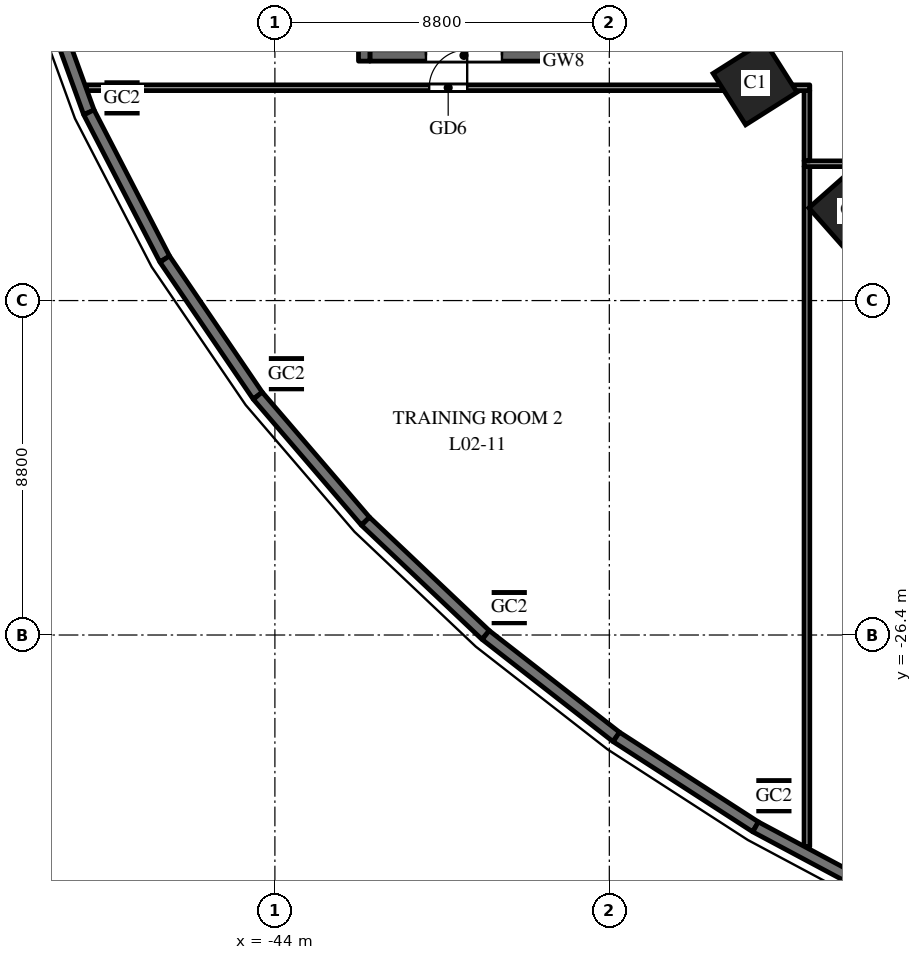
"""IFC4 building model, lengths in metres.
Left out: names, types, materials, properties, quantities, classifications, styles, units other than length and angle.
Written with IfcOpenShell. Run it as: python <this file> out.ifc"""

import sys

from ifc_helpers import new_model, si_unit, direction, frame, frame_2d, origin, origin_2d, place, context, subcontext, project, spatial, rectangle, hollow_rectangle, extrude, element, fill, save


model = new_model("IFC4")
c1 = context("Model", 3, precision=1e-05, world=origin(), true_north=direction((0.0, 1.0)))
c2 = subcontext(c1, "Body", "Model", "MODEL_VIEW")
j1 = project(units=[si_unit("LENGTHUNIT", "METRE"), si_unit("PLANEANGLEUNIT", "RADIAN")], contexts=[c1])
p1 = place(None, origin())
s1 = spatial("IfcSite", under=j1, at=p1, CompositionType="ELEMENT")
p2 = place(p1, origin())
s2 = spatial("IfcBuilding", under=s1, at=p2, CompositionType="ELEMENT")
p3 = place(p2, frame((0.0, 0.0, 13.5)))
s3 = spatial("IfcBuildingStorey", under=s2, at=p3, CompositionType="ELEMENT", Elevation=13.5)
for number, where, z_axis, x_axis in (
    (1, (-31.365, -11.871, 0.0), (0.0, 0.0, 1.0), (0.535, -0.845, 0.0)),
    (2, (-28.819, -15.23, 0.0), (0.0, 0.0, 1.0), (0.663, -0.749, 0.0)),
):
    element("IfcColumn", number, at=place(p3, frame(where, z_axis=z_axis, x_axis=x_axis)), inside=s3, PredefinedType="COLUMN", context=c2, shape_type="SweptSolid", body=[
        extrude(rectangle(XDim=1.6, YDim=1.6, at=origin_2d()), origin(), (0.0, 0.0, 1.0), 6.0),
    ])
for number, where, z_axis, x_axis in (
    (3, (-48.022, -12.267, 0.0), (0.0, 0.0, 1.0), (1.0, 0.0, 0.0)),
    (4, (-43.696, -19.525, 0.0), (0.0, 0.0, 1.0), (1.0, 0.0, 0.0)),
    (5, (-37.833, -25.68, 0.0), (0.0, 0.0, 1.0), (1.0, 0.0, 0.0)),
    (6, (-30.869, -30.629, 0.0), (0.0, 0.0, 1.0), (1.0, 0.0, 0.0)),
):
    element("IfcColumn", number, at=place(p3, frame(where, z_axis=z_axis, x_axis=x_axis)), inside=s3, PredefinedType="COLUMN", context=c2, shape_type="SweptSolid", body=[
        extrude(hollow_rectangle(XDim=0.8, YDim=0.8, WallThickness=0.04, at=origin_2d()), origin(), (0.0, 0.0, 1.0), 6.0),
    ])
p4 = place(p3, frame((-30.0, -31.97, 0.0), z_axis=(0.0, 0.0, 1.0), x_axis=(0.0, 1.0, 0.0)))
e7 = element("IfcWall", 7, at=p4, inside=s3, PredefinedType="PARTITIONING", context=c2, shape_type="SweptSolid", body=[
    extrude(rectangle(XDim=17.895, YDim=0.15, at=frame_2d((8.948, 0.0))), origin(), (0.0, 0.0, 1.0), 4.75),
])
p5 = place(p3, frame((-30.075, -14.0, 0.0), z_axis=(0.0, 0.0, 1.0), x_axis=(1.0, 0.0, 0.0)))
e8 = element("IfcWall", 8, at=p5, inside=s3, PredefinedType="PARTITIONING", context=c2, shape_type="SweptSolid", body=[
    extrude(rectangle(XDim=20.0, YDim=0.15, at=frame_2d((10.0, 0.0))), origin(), (0.0, 0.0, 1.0), 4.7),
])
p6 = place(p5, frame((9.5, 0.0, 0.0)))
e9 = element("IfcOpeningElement", 9, at=p6, cuts=e8, PredefinedType="OPENING", context=c2, shape_type="SweptSolid", body=[
    extrude(rectangle(XDim=1.0, YDim=2.1, at=frame_2d((0.5, 1.05))), frame((0.0, 0.085, 0.0), z_axis=(0.0, -1.0, 0.0), x_axis=(1.0, 0.0, 0.0)), (0.0, 0.0, 1.0), 0.17),
])
p7 = place(p3, frame((-30.0, -12.075, 0.0), z_axis=(0.0, 0.0, 1.0), x_axis=(0.0, -1.0, 0.0)))
e10 = element("IfcWall", 10, at=p7, inside=s3, PredefinedType="PARTITIONING", context=c2, shape_type="SweptSolid", body=[
    extrude(rectangle(XDim=1.851, YDim=0.15, at=frame_2d((0.926, 0.0))), origin(), (0.0, 0.0, 1.0), 4.85),
])
p8 = place(p3, frame((-48.955, -12.0, 0.0), z_axis=(0.0, 0.0, 1.0), x_axis=(1.0, 0.0, 0.0)))
e11 = element("IfcWall", 11, at=p8, inside=s3, PredefinedType="PARTITIONING", context=c2, shape_type="SweptSolid", body=[
    extrude(rectangle(XDim=19.03, YDim=0.15, at=frame_2d((9.515, 0.0))), origin(), (0.0, 0.0, 1.0), 4.75),
])
p9 = place(p8, frame((9.015, 0.0, 0.0)))
e12 = element("IfcOpeningElement", 12, at=p9, cuts=e11, PredefinedType="OPENING", context=c2, shape_type="SweptSolid", body=[
    extrude(rectangle(XDim=1.0, YDim=2.1, at=frame_2d((0.5, 1.05))), frame((0.0, 0.085, 0.0), z_axis=(0.0, -1.0, 0.0), x_axis=(1.0, 0.0, 0.0)), (0.0, 0.0, 1.0), 0.17),
])
p10 = place(p3, frame((-50.376, -8.568, 0.0), z_axis=(0.0, 0.0, 1.0), x_axis=(0.341286990045, -0.939959142956, 0.0)))
e13 = element("IfcWall", 13, at=p10, inside=s3, PredefinedType="SOLIDWALL", context=c2, shape_type="SweptSolid", body=[
    extrude(rectangle(XDim=4.342, YDim=0.3, at=frame_2d((2.171, 0.0))), origin(), (0.0, 0.0, 1.0), 5.75),
])
p11 = place(p10, frame((0.971, 0.0, 1.0)))
e14 = element("IfcOpeningElement", 14, at=p11, cuts=e13, PredefinedType="OPENING", context=c2, shape_type="SweptSolid", body=[
    extrude(rectangle(XDim=2.4, YDim=3.0, at=frame_2d((1.2, 1.5))), frame((0.0, 0.16, 0.0), z_axis=(0.0, -1.0, 0.0), x_axis=(1.0, 0.0, 0.0)), (0.0, 0.0, 1.0), 0.32),
])
p12 = place(p3, frame((-48.894, -12.649, 0.0), z_axis=(0.0, 0.0, 1.0), x_axis=(0.459242531468, -0.888310923771, 0.0)))
e15 = element("IfcWall", 15, at=p12, inside=s3, PredefinedType="SOLIDWALL", context=c2, shape_type="SweptSolid", body=[
    extrude(rectangle(XDim=4.345, YDim=0.3, at=frame_2d((2.172, 0.0))), origin(), (0.0, 0.0, 1.0), 5.75),
])
p13 = place(p12, frame((0.972, 0.0, 1.0)))
e16 = element("IfcOpeningElement", 16, at=p13, cuts=e15, PredefinedType="OPENING", context=c2, shape_type="SweptSolid", body=[
    extrude(rectangle(XDim=2.4, YDim=3.0, at=frame_2d((1.2, 1.5))), frame((0.0, 0.16, 0.0), z_axis=(0.0, -1.0, 0.0), x_axis=(1.0, 0.0, 0.0)), (0.0, 0.0, 1.0), 0.32),
])
p14 = place(p3, frame((-46.899, -16.508, 0.0), z_axis=(0.0, 0.0, 1.0), x_axis=(0.562667738859, -0.82668314102, 0.0)))
e17 = element("IfcWall", 17, at=p14, inside=s3, PredefinedType="SOLIDWALL", context=c2, shape_type="SweptSolid", body=[
    extrude(rectangle(XDim=4.349, YDim=0.3, at=frame_2d((2.174, 0.0))), origin(), (0.0, 0.0, 1.0), 5.75),
])
p15 = place(p14, frame((0.974, 0.0, 1.0)))
e18 = element("IfcOpeningElement", 18, at=p15, cuts=e17, PredefinedType="OPENING", context=c2, shape_type="SweptSolid", body=[
    extrude(rectangle(XDim=2.4, YDim=3.0, at=frame_2d((1.2, 1.5))), frame((0.0, 0.16, 0.0), z_axis=(0.0, -1.0, 0.0), x_axis=(1.0, 0.0, 0.0)), (0.0, 0.0, 1.0), 0.32),
])
p16 = place(p3, frame((-44.452, -20.104, 0.0), z_axis=(0.0, 0.0, 1.0), x_axis=(0.651387059497, -0.758745608699, 0.0)))
e19 = element("IfcWall", 19, at=p16, inside=s3, PredefinedType="SOLIDWALL", context=c2, shape_type="SweptSolid", body=[
    extrude(rectangle(XDim=4.353, YDim=0.3, at=frame_2d((2.176, 0.0))), origin(), (0.0, 0.0, 1.0), 5.75),
])
p17 = place(p16, frame((0.976, 0.0, 1.0)))
e20 = element("IfcOpeningElement", 20, at=p17, cuts=e19, PredefinedType="OPENING", context=c2, shape_type="SweptSolid", body=[
    extrude(rectangle(XDim=2.4, YDim=3.0, at=frame_2d((1.2, 1.5))), frame((0.0, 0.16, 0.0), z_axis=(0.0, -1.0, 0.0), x_axis=(1.0, 0.0, 0.0)), (0.0, 0.0, 1.0), 0.32),
])
p18 = place(p3, frame((-41.617, -23.406, 0.0), z_axis=(0.0, 0.0, 1.0), x_axis=(0.72620446032, -0.687478786444, 0.0)))
e21 = element("IfcWall", 21, at=p18, inside=s3, PredefinedType="SOLIDWALL", context=c2, shape_type="SweptSolid", body=[
    extrude(rectangle(XDim=4.356, YDim=0.3, at=frame_2d((2.178, 0.0))), origin(), (0.0, 0.0, 1.0), 5.75),
])
p19 = place(p18, frame((0.978, 0.0, 1.0)))
e22 = element("IfcOpeningElement", 22, at=p19, cuts=e21, PredefinedType="OPENING", context=c2, shape_type="SweptSolid", body=[
    extrude(rectangle(XDim=2.4, YDim=3.0, at=frame_2d((1.2, 1.5))), frame((0.0, 0.16, 0.0), z_axis=(0.0, -1.0, 0.0), x_axis=(1.0, 0.0, 0.0)), (0.0, 0.0, 1.0), 0.32),
])
p20 = place(p3, frame((-38.453, -26.401, 0.0), z_axis=(0.0, 0.0, 1.0), x_axis=(0.788491985196, -0.615045030288, 0.0)))
e23 = element("IfcWall", 23, at=p20, inside=s3, PredefinedType="SOLIDWALL", context=c2, shape_type="SweptSolid", body=[
    extrude(rectangle(XDim=4.359, YDim=0.3, at=frame_2d((2.18, 0.0))), origin(), (0.0, 0.0, 1.0), 5.75),
])
p21 = place(p20, frame((0.98, 0.0, 1.0)))
e24 = element("IfcOpeningElement", 24, at=p21, cuts=e23, PredefinedType="OPENING", context=c2, shape_type="SweptSolid", body=[
    extrude(rectangle(XDim=2.4, YDim=3.0, at=frame_2d((1.2, 1.5))), frame((0.0, 0.16, 0.0), z_axis=(0.0, -1.0, 0.0), x_axis=(1.0, 0.0, 0.0)), (0.0, 0.0, 1.0), 0.32),
])
p22 = place(p3, frame((-35.016, -29.082, 0.0), z_axis=(0.0, 0.0, 1.0), x_axis=(0.840047348843, -0.542513088969, 0.0)))
e25 = element("IfcWall", 25, at=p22, inside=s3, PredefinedType="SOLIDWALL", context=c2, shape_type="SweptSolid", body=[
    extrude(rectangle(XDim=4.362, YDim=0.3, at=frame_2d((2.181, 0.0))), origin(), (0.0, 0.0, 1.0), 5.75),
])
p23 = place(p22, frame((0.981, 0.0, 1.0)))
e26 = element("IfcOpeningElement", 26, at=p23, cuts=e25, PredefinedType="OPENING", context=c2, shape_type="SweptSolid", body=[
    extrude(rectangle(XDim=2.4, YDim=3.0, at=frame_2d((1.2, 1.5))), frame((0.0, 0.16, 0.0), z_axis=(0.0, -1.0, 0.0), x_axis=(1.0, 0.0, 0.0)), (0.0, 0.0, 1.0), 0.32),
])
p24 = place(p3, frame((-31.352, -31.448, 0.0), z_axis=(0.0, 0.0, 1.0), x_axis=(0.882159305704, -0.47095112205, 0.0)))
e27 = element("IfcWall", 27, at=p24, inside=s3, PredefinedType="SOLIDWALL", context=c2, shape_type="SweptSolid", body=[
    extrude(rectangle(XDim=4.365, YDim=0.3, at=frame_2d((2.182, 0.0))), origin(), (0.0, 0.0, 1.0), 5.75),
])
p25 = place(p24, frame((1.622, 0.0, 1.0)))
e28 = element("IfcOpeningElement", 28, at=p25, cuts=e27, PredefinedType="OPENING", context=c2, shape_type="SweptSolid", body=[
    extrude(rectangle(XDim=2.4, YDim=3.0, at=frame_2d((1.2, 1.5))), frame((0.0, 0.16, 0.0), z_axis=(0.0, -1.0, 0.0), x_axis=(1.0, 0.0, 0.0)), (0.0, 0.0, 1.0), 0.32),
])
for number, where, z_axis, x_axis in (
    (29, (-41.65, -11.3, 0.0), (0.0, 0.0, 1.0), (0.0, 1.0, 0.0)),
    (30, (-36.4, -11.3, 0.0), (0.0, 0.0, 1.0), (0.0, 1.0, 0.0)),
):
    element("IfcWall", number, at=place(p3, frame(where, z_axis=z_axis, x_axis=x_axis)), inside=s3, PredefinedType="SHEAR", context=c2, shape_type="SweptSolid", body=[
        extrude(rectangle(XDim=11.0, YDim=0.3, at=frame_2d((5.5, 0.0))), origin(), (0.0, 0.0, 1.0), 5.75),
    ])
p26 = place(p3, frame((-41.5, -11.15, 0.0), z_axis=(0.0, 0.0, 1.0), x_axis=(1.0, 0.0, 0.0)))
e31 = element("IfcWall", 31, at=p26, inside=s3, PredefinedType="SHEAR", context=c2, shape_type="SweptSolid", body=[
    extrude(rectangle(XDim=4.95, YDim=0.3, at=frame_2d((2.475, 0.0))), origin(), (0.0, 0.0, 1.0), 5.75),
])
p27 = place(p26, frame((1.475, 0.0, 0.0)))
e32 = element("IfcOpeningElement", 32, at=p27, cuts=e31, PredefinedType="OPENING", context=c2, shape_type="SweptSolid", body=[
    extrude(rectangle(XDim=2.0, YDim=2.1, at=frame_2d((1.0, 1.05))), frame((0.0, 0.16, 0.0), z_axis=(0.0, -1.0, 0.0), x_axis=(1.0, 0.0, 0.0)), (0.0, 0.0, 1.0), 0.32),
])
p28 = place(p9, origin())
e33 = element("IfcDoor", 33, at=p28, inside=s3, OperationType="SINGLE_SWING_RIGHT", PredefinedType="DOOR", context=c2, shape_type="SweptSolid", body=[
    extrude(rectangle(XDim=1.0, YDim=2.1, at=frame_2d((0.5, 1.05))), frame((0.0, 0.025, 0.0), z_axis=(0.0, -1.0, 0.0), x_axis=(1.0, 0.0, 0.0)), (0.0, 0.0, 1.0), 0.05),
])
fill(e12, e33)
p29 = place(p11, origin())
e34 = element("IfcWindow", 34, at=p29, inside=s3, PartitioningType="SINGLE_PANEL", PredefinedType="WINDOW", context=c2, shape_type="SweptSolid", body=[
    extrude(rectangle(XDim=2.4, YDim=3.0, at=frame_2d((1.2, 1.5))), frame((0.0, 0.03, 0.0), z_axis=(0.0, -1.0, 0.0), x_axis=(1.0, 0.0, 0.0)), (0.0, 0.0, 1.0), 0.06),
])
fill(e14, e34)
p30 = place(p13, origin())
e35 = element("IfcWindow", 35, at=p30, inside=s3, PartitioningType="SINGLE_PANEL", PredefinedType="WINDOW", context=c2, shape_type="SweptSolid", body=[
    extrude(rectangle(XDim=2.4, YDim=3.0, at=frame_2d((1.2, 1.5))), frame((0.0, 0.03, 0.0), z_axis=(0.0, -1.0, 0.0), x_axis=(1.0, 0.0, 0.0)), (0.0, 0.0, 1.0), 0.06),
])
fill(e16, e35)
p31 = place(p15, origin())
e36 = element("IfcWindow", 36, at=p31, inside=s3, PartitioningType="SINGLE_PANEL", PredefinedType="WINDOW", context=c2, shape_type="SweptSolid", body=[
    extrude(rectangle(XDim=2.4, YDim=3.0, at=frame_2d((1.2, 1.5))), frame((0.0, 0.03, 0.0), z_axis=(0.0, -1.0, 0.0), x_axis=(1.0, 0.0, 0.0)), (0.0, 0.0, 1.0), 0.06),
])
fill(e18, e36)
p32 = place(p17, origin())
e37 = element("IfcWindow", 37, at=p32, inside=s3, PartitioningType="SINGLE_PANEL", PredefinedType="WINDOW", context=c2, shape_type="SweptSolid", body=[
    extrude(rectangle(XDim=2.4, YDim=3.0, at=frame_2d((1.2, 1.5))), frame((0.0, 0.03, 0.0), z_axis=(0.0, -1.0, 0.0), x_axis=(1.0, 0.0, 0.0)), (0.0, 0.0, 1.0), 0.06),
])
fill(e20, e37)
p33 = place(p19, origin())
e38 = element("IfcWindow", 38, at=p33, inside=s3, PartitioningType="SINGLE_PANEL", PredefinedType="WINDOW", context=c2, shape_type="SweptSolid", body=[
    extrude(rectangle(XDim=2.4, YDim=3.0, at=frame_2d((1.2, 1.5))), frame((0.0, 0.03, 0.0), z_axis=(0.0, -1.0, 0.0), x_axis=(1.0, 0.0, 0.0)), (0.0, 0.0, 1.0), 0.06),
])
fill(e22, e38)
p34 = place(p21, origin())
e39 = element("IfcWindow", 39, at=p34, inside=s3, PartitioningType="SINGLE_PANEL", PredefinedType="WINDOW", context=c2, shape_type="SweptSolid", body=[
    extrude(rectangle(XDim=2.4, YDim=3.0, at=frame_2d((1.2, 1.5))), frame((0.0, 0.03, 0.0), z_axis=(0.0, -1.0, 0.0), x_axis=(1.0, 0.0, 0.0)), (0.0, 0.0, 1.0), 0.06),
])
fill(e24, e39)
p35 = place(p23, origin())
e40 = element("IfcWindow", 40, at=p35, inside=s3, PartitioningType="SINGLE_PANEL", PredefinedType="WINDOW", context=c2, shape_type="SweptSolid", body=[
    extrude(rectangle(XDim=2.4, YDim=3.0, at=frame_2d((1.2, 1.5))), frame((0.0, 0.03, 0.0), z_axis=(0.0, -1.0, 0.0), x_axis=(1.0, 0.0, 0.0)), (0.0, 0.0, 1.0), 0.06),
])
fill(e26, e40)
p36 = place(p25, origin())
e41 = element("IfcWindow", 41, at=p36, inside=s3, PartitioningType="SINGLE_PANEL", PredefinedType="WINDOW", context=c2, shape_type="SweptSolid", body=[
    extrude(rectangle(XDim=2.4, YDim=3.0, at=frame_2d((1.2, 1.5))), frame((0.0, 0.03, 0.0), z_axis=(0.0, -1.0, 0.0), x_axis=(1.0, 0.0, 0.0)), (0.0, 0.0, 1.0), 0.06),
])
fill(e28, e41)
p37 = place(p27, origin())
e42 = element("IfcDoor", 42, at=p37, inside=s3, OperationType="DOUBLE_DOOR_SINGLE_SWING", PredefinedType="DOOR", context=c2, shape_type="SweptSolid", body=[
    extrude(rectangle(XDim=2.0, YDim=2.1, at=frame_2d((1.0, 1.05))), frame((0.0, 0.025, 0.0), z_axis=(0.0, -1.0, 0.0), x_axis=(1.0, 0.0, 0.0)), (0.0, 0.0, 1.0), 0.05),
])
fill(e32, e42)
save(model, sys.argv[1])
